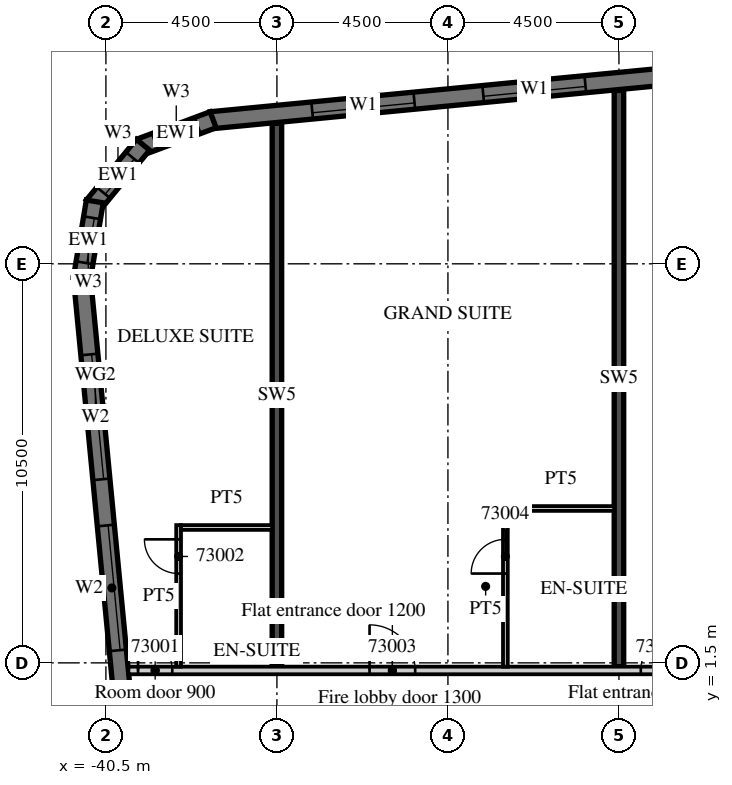
"""IFC4 building model, lengths in metres.
Left out: names, types, materials, properties, quantities, classifications, styles, units other than length and angle.
Written with IfcOpenShell. Run it as: python <this file> out.ifc"""

import sys

from ifc_helpers import new_model, si_unit, direction, frame, frame_2d, origin, place, context, subcontext, project, spatial, polyline, rectangle, outline, extrude, element, fill, save


model = new_model("IFC4")
c1 = context("Model", 3, precision=1e-05, world=origin(), true_north=direction((0.0, 1.0)))
c2 = subcontext(c1, "Body", "Model", "MODEL_VIEW")
j1 = project(units=[si_unit("LENGTHUNIT", "METRE"), si_unit("PLANEANGLEUNIT", "RADIAN")], contexts=[c1])
p1 = place(None, origin())
s1 = spatial("IfcSite", under=j1, at=p1, CompositionType="ELEMENT")
p2 = place(p1, origin())
s2 = spatial("IfcBuilding", under=s1, at=p2, CompositionType="ELEMENT")
p3 = place(p2, frame((0.0, 0.0, 291.6)))
s3 = spatial("IfcBuildingStorey", under=s2, at=p3, CompositionType="ELEMENT", Elevation=291.6)
p4 = place(p3, frame((-36.0, 1.4, 0.0), z_axis=(0.0, 0.0, 1.0), x_axis=(0.0, 1.0, 0.0)))
e1 = element("IfcWall", 1, at=p4, inside=s3, PredefinedType="SHEAR", context=c2, shape_type="SweptSolid", body=[
    extrude(rectangle(XDim=14.296, YDim=0.25, at=frame_2d((7.148, 0.0))), origin(), (0.0, 0.0, 1.0), 3.3),
])
p5 = place(p3, frame((-27.0, 1.4, 0.0), z_axis=(0.0, 0.0, 1.0), x_axis=(0.0, 1.0, 0.0)))
e2 = element("IfcWall", 2, at=p5, inside=s3, PredefinedType="SHEAR", context=c2, shape_type="SweptSolid", body=[
    extrude(rectangle(XDim=15.163, YDim=0.25, at=frame_2d((7.582, 0.0))), origin(), (0.0, 0.0, 1.0), 3.3),
])
p6 = place(p3, frame((-41.132, 11.658, 0.0), z_axis=(0.0, 0.0, 1.0), x_axis=(0.095847749461, -0.995396006082, 0.0)))
e3 = element("IfcWall", 3, at=p6, inside=s3, PredefinedType="SOLIDWALL", context=c2, shape_type="SweptSolid", body=[
    extrude(rectangle(XDim=32.0, YDim=0.45, at=frame_2d((16.0, 0.0))), origin(), (0.0, 0.0, 1.0), 3.02),
])
p7 = place(p6, frame((2.053, 0.0, 0.45)))
e4 = element("IfcOpeningElement", 4, at=p7, cuts=e3, PredefinedType="OPENING", context=c2, shape_type="SweptSolid", body=[
    extrude(rectangle(XDim=3.3, YDim=2.25, at=frame_2d((1.65, 1.125))), frame((0.0, 0.235, 0.0), z_axis=(0.0, -1.0, 0.0), x_axis=(1.0, 0.0, 0.0)), (0.0, 0.0, 1.0), 0.47),
])
p8 = place(p6, frame((6.574, 0.0, 0.45)))
e5 = element("IfcOpeningElement", 5, at=p8, cuts=e3, PredefinedType="OPENING", context=c2, shape_type="SweptSolid", body=[
    extrude(rectangle(XDim=3.3, YDim=2.25, at=frame_2d((1.65, 1.125))), frame((0.0, 0.235, 0.0), z_axis=(0.0, -1.0, 0.0), x_axis=(1.0, 0.0, 0.0)), (0.0, 0.0, 1.0), 0.47),
])
p9 = place(p3, frame((13.521, 20.713, 0.0), z_axis=(0.0, 0.0, 1.0), x_axis=(-0.995396277313, -0.095844932638, 0.0)))
e6 = element("IfcWall", 6, at=p9, inside=s3, PredefinedType="SOLIDWALL", context=c2, shape_type="SweptSolid", body=[
    extrude(rectangle(XDim=51.495, YDim=0.45, at=frame_2d((25.748, 0.0))), origin(), (0.0, 0.0, 1.0), 3.02),
])
p10 = place(p9, frame((0.91, 0.0, 0.45)))
e7 = element("IfcOpeningElement", 7, at=p10, cuts=e6, PredefinedType="OPENING", context=c2, shape_type="SweptSolid", body=[
    extrude(rectangle(XDim=2.7, YDim=2.25, at=frame_2d((1.35, 1.125))), frame((0.0, 0.235, 0.0), z_axis=(0.0, -1.0, 0.0), x_axis=(1.0, 0.0, 0.0)), (0.0, 0.0, 1.0), 0.47),
])
p11 = place(p9, frame((5.431, 0.0, 0.45)))
e8 = element("IfcOpeningElement", 8, at=p11, cuts=e6, PredefinedType="OPENING", context=c2, shape_type="SweptSolid", body=[
    extrude(rectangle(XDim=2.7, YDim=2.25, at=frame_2d((1.35, 1.125))), frame((0.0, 0.235, 0.0), z_axis=(0.0, -1.0, 0.0), x_axis=(1.0, 0.0, 0.0)), (0.0, 0.0, 1.0), 0.47),
])
p12 = place(p9, frame((9.952, 0.0, 0.45)))
e9 = element("IfcOpeningElement", 9, at=p12, cuts=e6, PredefinedType="OPENING", context=c2, shape_type="SweptSolid", body=[
    extrude(rectangle(XDim=2.7, YDim=2.25, at=frame_2d((1.35, 1.125))), frame((0.0, 0.235, 0.0), z_axis=(0.0, -1.0, 0.0), x_axis=(1.0, 0.0, 0.0)), (0.0, 0.0, 1.0), 0.47),
])
p13 = place(p9, frame((14.473, 0.0, 0.45)))
e10 = element("IfcOpeningElement", 10, at=p13, cuts=e6, PredefinedType="OPENING", context=c2, shape_type="SweptSolid", body=[
    extrude(rectangle(XDim=2.7, YDim=2.25, at=frame_2d((1.35, 1.125))), frame((0.0, 0.235, 0.0), z_axis=(0.0, -1.0, 0.0), x_axis=(1.0, 0.0, 0.0)), (0.0, 0.0, 1.0), 0.47),
])
p14 = place(p9, frame((18.994, 0.0, 0.45)))
e11 = element("IfcOpeningElement", 11, at=p14, cuts=e6, PredefinedType="OPENING", context=c2, shape_type="SweptSolid", body=[
    extrude(rectangle(XDim=2.7, YDim=2.25, at=frame_2d((1.35, 1.125))), frame((0.0, 0.235, 0.0), z_axis=(0.0, -1.0, 0.0), x_axis=(1.0, 0.0, 0.0)), (0.0, 0.0, 1.0), 0.47),
])
p15 = place(p9, frame((23.514, 0.0, 0.45)))
e12 = element("IfcOpeningElement", 12, at=p15, cuts=e6, PredefinedType="OPENING", context=c2, shape_type="SweptSolid", body=[
    extrude(rectangle(XDim=2.7, YDim=2.25, at=frame_2d((1.35, 1.125))), frame((0.0, 0.235, 0.0), z_axis=(0.0, -1.0, 0.0), x_axis=(1.0, 0.0, 0.0)), (0.0, 0.0, 1.0), 0.47),
])
p16 = place(p9, frame((28.035, 0.0, 0.45)))
e13 = element("IfcOpeningElement", 13, at=p16, cuts=e6, PredefinedType="OPENING", context=c2, shape_type="SweptSolid", body=[
    extrude(rectangle(XDim=2.7, YDim=2.25, at=frame_2d((1.35, 1.125))), frame((0.0, 0.235, 0.0), z_axis=(0.0, -1.0, 0.0), x_axis=(1.0, 0.0, 0.0)), (0.0, 0.0, 1.0), 0.47),
])
p17 = place(p9, frame((32.556, 0.0, 0.45)))
e14 = element("IfcOpeningElement", 14, at=p17, cuts=e6, PredefinedType="OPENING", context=c2, shape_type="SweptSolid", body=[
    extrude(rectangle(XDim=2.7, YDim=2.25, at=frame_2d((1.35, 1.125))), frame((0.0, 0.235, 0.0), z_axis=(0.0, -1.0, 0.0), x_axis=(1.0, 0.0, 0.0)), (0.0, 0.0, 1.0), 0.47),
])
p18 = place(p9, frame((37.077, 0.0, 0.45)))
e15 = element("IfcOpeningElement", 15, at=p18, cuts=e6, PredefinedType="OPENING", context=c2, shape_type="SweptSolid", body=[
    extrude(rectangle(XDim=2.7, YDim=2.25, at=frame_2d((1.35, 1.125))), frame((0.0, 0.235, 0.0), z_axis=(0.0, -1.0, 0.0), x_axis=(1.0, 0.0, 0.0)), (0.0, 0.0, 1.0), 0.47),
])
p19 = place(p9, frame((41.598, 0.0, 0.45)))
e16 = element("IfcOpeningElement", 16, at=p19, cuts=e6, PredefinedType="OPENING", context=c2, shape_type="SweptSolid", body=[
    extrude(rectangle(XDim=2.7, YDim=2.25, at=frame_2d((1.35, 1.125))), frame((0.0, 0.235, 0.0), z_axis=(0.0, -1.0, 0.0), x_axis=(1.0, 0.0, 0.0)), (0.0, 0.0, 1.0), 0.47),
])
p20 = place(p9, frame((46.118, 0.0, 0.45)))
e17 = element("IfcOpeningElement", 17, at=p20, cuts=e6, PredefinedType="OPENING", context=c2, shape_type="SweptSolid", body=[
    extrude(rectangle(XDim=2.7, YDim=2.25, at=frame_2d((1.35, 1.125))), frame((0.0, 0.235, 0.0), z_axis=(0.0, -1.0, 0.0), x_axis=(1.0, 0.0, 0.0)), (0.0, 0.0, 1.0), 0.47),
])
p21 = place(p3, frame((-37.679, 15.791, 0.0), z_axis=(0.0, 0.0, 1.0), x_axis=(-0.936677599948, -0.350192909346, 0.0)))
e18 = element("IfcWall", 18, at=p21, inside=s3, PredefinedType="SOLIDWALL", context=c2, shape_type="SweptSolid", body=[
    extrude(outline(polyline([(0.0, -0.225), (2.071, -0.225), (1.95, 0.225), (0.121, 0.225), (0.0, -0.225)])), origin(), (0.0, 0.0, 1.0), 3.02),
])
p22 = place(p21, frame((0.435, 0.0, 0.45)))
e19 = element("IfcOpeningElement", 19, at=p22, cuts=e18, PredefinedType="OPENING", context=c2, shape_type="SweptSolid", body=[
    extrude(rectangle(XDim=1.2, YDim=2.25, at=frame_2d((0.6, 1.125))), frame((0.0, 0.235, 0.0), z_axis=(0.0, -1.0, 0.0), x_axis=(1.0, 0.0, 0.0)), (0.0, 0.0, 1.0), 0.47),
])
p23 = place(p3, frame((-39.524, 15.133, 0.0), z_axis=(0.0, 0.0, 1.0), x_axis=(-0.636046112757, -0.771651049663, 0.0)))
e20 = element("IfcWall", 20, at=p23, inside=s3, PredefinedType="SOLIDWALL", context=c2, shape_type="SweptSolid", body=[
    extrude(outline(polyline([(0.0, -0.225), (2.071, -0.225), (1.95, 0.225), (0.121, 0.225), (0.0, -0.225)])), origin(), (0.0, 0.0, 1.0), 3.02),
])
p24 = place(p23, frame((0.435, 0.0, 0.45)))
e21 = element("IfcOpeningElement", 21, at=p24, cuts=e20, PredefinedType="OPENING", context=c2, shape_type="SweptSolid", body=[
    extrude(rectangle(XDim=1.2, YDim=2.25, at=frame_2d((0.6, 1.125))), frame((0.0, 0.235, 0.0), z_axis=(0.0, -1.0, 0.0), x_axis=(1.0, 0.0, 0.0)), (0.0, 0.0, 1.0), 0.47),
])
p25 = place(p3, frame((-40.792, 13.641, 0.0), z_axis=(0.0, 0.0, 1.0), x_axis=(-0.165068144653, -0.986282164302, 0.0)))
e22 = element("IfcWall", 22, at=p25, inside=s3, PredefinedType="SOLIDWALL", context=c2, shape_type="SweptSolid", body=[
    extrude(outline(polyline([(0.0, -0.225), (2.071, -0.225), (1.95, 0.225), (0.121, 0.225), (0.0, -0.225)])), origin(), (0.0, 0.0, 1.0), 3.02),
])
p26 = place(p25, frame((0.435, 0.0, 0.45)))
e23 = element("IfcOpeningElement", 23, at=p26, cuts=e22, PredefinedType="OPENING", context=c2, shape_type="SweptSolid", body=[
    extrude(rectangle(XDim=1.2, YDim=2.25, at=frame_2d((0.6, 1.125))), frame((0.0, 0.235, 0.0), z_axis=(0.0, -1.0, 0.0), x_axis=(1.0, 0.0, 0.0)), (0.0, 0.0, 1.0), 0.47),
])
p27 = place(p3, frame((-39.909, 1.3, 0.0), z_axis=(0.0, 0.0, 1.0), x_axis=(1.0, 0.0, 0.0)))
e24 = element("IfcWall", 24, at=p27, inside=s3, PredefinedType="PARTITIONING", context=c2, shape_type="SweptSolid", body=[
    extrude(rectangle(XDim=53.409, YDim=0.2, at=frame_2d((26.705, 0.0))), origin(), (0.0, 0.0, 1.0), 3.02),
])
p28 = place(p27, frame((0.255, 0.0, 0.0)))
e25 = element("IfcOpeningElement", 25, at=p28, cuts=e24, PredefinedType="OPENING", context=c2, shape_type="SweptSolid", body=[
    extrude(rectangle(XDim=0.9, YDim=2.1, at=frame_2d((0.45, 1.05))), frame((0.0, 0.11, 0.0), z_axis=(0.0, -1.0, 0.0), x_axis=(1.0, 0.0, 0.0)), (0.0, 0.0, 1.0), 0.22),
])
p29 = place(p27, frame((6.347, 0.0, 0.0)))
e26 = element("IfcOpeningElement", 26, at=p29, cuts=e24, PredefinedType="OPENING", context=c2, shape_type="SweptSolid", body=[
    extrude(rectangle(XDim=1.2, YDim=2.1, at=frame_2d((0.6, 1.05))), frame((0.0, 0.11, 0.0), z_axis=(0.0, -1.0, 0.0), x_axis=(1.0, 0.0, 0.0)), (0.0, 0.0, 1.0), 0.22),
])
p30 = place(p27, frame((13.484, 0.0, 0.0)))
e27 = element("IfcOpeningElement", 27, at=p30, cuts=e24, PredefinedType="OPENING", context=c2, shape_type="SweptSolid", body=[
    extrude(rectangle(XDim=1.0, YDim=2.1, at=frame_2d((0.5, 1.05))), frame((0.0, 0.11, 0.0), z_axis=(0.0, -1.0, 0.0), x_axis=(1.0, 0.0, 0.0)), (0.0, 0.0, 1.0), 0.22),
])
p31 = place(p27, frame((20.334, 0.0, 0.0)))
e28 = element("IfcOpeningElement", 28, at=p31, cuts=e24, PredefinedType="OPENING", context=c2, shape_type="SweptSolid", body=[
    extrude(rectangle(XDim=1.0, YDim=2.1, at=frame_2d((0.5, 1.05))), frame((0.0, 0.11, 0.0), z_axis=(0.0, -1.0, 0.0), x_axis=(1.0, 0.0, 0.0)), (0.0, 0.0, 1.0), 0.22),
])
p32 = place(p27, frame((22.484, 0.0, 0.0)))
e29 = element("IfcOpeningElement", 29, at=p32, cuts=e24, PredefinedType="OPENING", context=c2, shape_type="SweptSolid", body=[
    extrude(rectangle(XDim=1.0, YDim=2.1, at=frame_2d((0.5, 1.05))), frame((0.0, 0.11, 0.0), z_axis=(0.0, -1.0, 0.0), x_axis=(1.0, 0.0, 0.0)), (0.0, 0.0, 1.0), 0.22),
])
p33 = place(p27, frame((26.959, 0.0, 0.0)))
e30 = element("IfcOpeningElement", 30, at=p33, cuts=e24, PredefinedType="OPENING", context=c2, shape_type="SweptSolid", body=[
    extrude(rectangle(XDim=1.0, YDim=2.1, at=frame_2d((0.5, 1.05))), frame((0.0, 0.11, 0.0), z_axis=(0.0, -1.0, 0.0), x_axis=(1.0, 0.0, 0.0)), (0.0, 0.0, 1.0), 0.22),
])
p34 = place(p27, frame((36.271, 0.0, 0.0)))
e31 = element("IfcOpeningElement", 31, at=p34, cuts=e24, PredefinedType="OPENING", context=c2, shape_type="SweptSolid", body=[
    extrude(rectangle(XDim=1.2, YDim=2.1, at=frame_2d((0.6, 1.05))), frame((0.0, 0.11, 0.0), z_axis=(0.0, -1.0, 0.0), x_axis=(1.0, 0.0, 0.0)), (0.0, 0.0, 1.0), 0.22),
])
p35 = place(p27, frame((40.484, 0.0, 0.0)))
e32 = element("IfcOpeningElement", 32, at=p35, cuts=e24, PredefinedType="OPENING", context=c2, shape_type="SweptSolid", body=[
    extrude(rectangle(XDim=1.0, YDim=2.1, at=frame_2d((0.5, 1.05))), frame((0.0, 0.11, 0.0), z_axis=(0.0, -1.0, 0.0), x_axis=(1.0, 0.0, 0.0)), (0.0, 0.0, 1.0), 0.22),
])
p36 = place(p27, frame((44.959, 0.0, 0.0)))
e33 = element("IfcOpeningElement", 33, at=p36, cuts=e24, PredefinedType="OPENING", context=c2, shape_type="SweptSolid", body=[
    extrude(rectangle(XDim=1.0, YDim=2.1, at=frame_2d((0.5, 1.05))), frame((0.0, 0.11, 0.0), z_axis=(0.0, -1.0, 0.0), x_axis=(1.0, 0.0, 0.0)), (0.0, 0.0, 1.0), 0.22),
])
p37 = place(p27, frame((51.834, 0.0, 0.0)))
e34 = element("IfcOpeningElement", 34, at=p37, cuts=e24, PredefinedType="OPENING", context=c2, shape_type="SweptSolid", body=[
    extrude(rectangle(XDim=1.0, YDim=2.1, at=frame_2d((0.5, 1.05))), frame((0.0, 0.11, 0.0), z_axis=(0.0, -1.0, 0.0), x_axis=(1.0, 0.0, 0.0)), (0.0, 0.0, 1.0), 0.22),
])
p38 = place(p3, frame((-38.587, 1.4, 0.0), z_axis=(0.0, 0.0, 1.0), x_axis=(0.0, 1.0, 0.0)))
e35 = element("IfcWall", 35, at=p38, inside=s3, PredefinedType="PARTITIONING", context=c2, shape_type="SweptSolid", body=[
    extrude(rectangle(XDim=3.725, YDim=0.125, at=frame_2d((1.863, 0.0))), origin(), (0.0, 0.0, 1.0), 3.02),
])
p39 = place(p38, frame((2.45, 0.0, 0.0)))
e36 = element("IfcOpeningElement", 36, at=p39, cuts=e35, PredefinedType="OPENING", context=c2, shape_type="SweptSolid", body=[
    extrude(rectangle(XDim=0.9, YDim=2.1, at=frame_2d((0.45, 1.05))), frame((0.0, 0.073, 0.0), z_axis=(0.0, -1.0, 0.0), x_axis=(1.0, 0.0, 0.0)), (0.0, 0.0, 1.0), 0.145),
])
p40 = place(p3, frame((-38.525, 5.062, 0.0), z_axis=(0.0, 0.0, 1.0), x_axis=(1.0, 0.0, 0.0)))
e37 = element("IfcWall", 37, at=p40, inside=s3, PredefinedType="PARTITIONING", context=c2, shape_type="SweptSolid", body=[
    extrude(rectangle(XDim=2.4, YDim=0.125, at=frame_2d((1.2, 0.0))), origin(), (0.0, 0.0, 1.0), 3.02),
])
p41 = place(p3, frame((-29.988, 1.4, 0.0), z_axis=(0.0, 0.0, 1.0), x_axis=(0.0, 1.0, 0.0)))
e38 = element("IfcWall", 38, at=p41, inside=s3, PredefinedType="PARTITIONING", context=c2, shape_type="SweptSolid", body=[
    extrude(rectangle(XDim=4.225, YDim=0.125, at=frame_2d((2.113, 0.0))), origin(), (0.0, 0.0, 1.0), 3.02),
])
p42 = place(p41, frame((2.45, 0.0, 0.0)))
e39 = element("IfcOpeningElement", 39, at=p42, cuts=e38, PredefinedType="OPENING", context=c2, shape_type="SweptSolid", body=[
    extrude(rectangle(XDim=0.9, YDim=2.1, at=frame_2d((0.45, 1.05))), frame((0.0, 0.073, 0.0), z_axis=(0.0, -1.0, 0.0), x_axis=(1.0, 0.0, 0.0)), (0.0, 0.0, 1.0), 0.145),
])
p43 = place(p3, frame((-29.925, 5.562, 0.0), z_axis=(0.0, 0.0, 1.0), x_axis=(1.0, 0.0, 0.0)))
e40 = element("IfcWall", 40, at=p43, inside=s3, PredefinedType="PARTITIONING", context=c2, shape_type="SweptSolid", body=[
    extrude(rectangle(XDim=2.8, YDim=0.125, at=frame_2d((1.4, 0.0))), origin(), (0.0, 0.0, 1.0), 3.02),
])
p44 = place(p7, origin())
e41 = element("IfcWindow", 41, at=p44, inside=s3, PartitioningType="SINGLE_PANEL", PredefinedType="WINDOW", context=c2, shape_type="SweptSolid", body=[
    extrude(rectangle(XDim=3.3, YDim=2.25, at=frame_2d((1.65, 1.125))), frame((0.0, 0.09, 0.0), z_axis=(0.0, -1.0, 0.0), x_axis=(1.0, 0.0, 0.0)), (0.0, 0.0, 1.0), 0.06),
])
fill(e4, e41)
p45 = place(p8, origin())
e42 = element("IfcWindow", 42, at=p45, inside=s3, PartitioningType="SINGLE_PANEL", PredefinedType="WINDOW", context=c2, shape_type="SweptSolid", body=[
    extrude(rectangle(XDim=3.3, YDim=2.25, at=frame_2d((1.65, 1.125))), frame((0.0, 0.09, 0.0), z_axis=(0.0, -1.0, 0.0), x_axis=(1.0, 0.0, 0.0)), (0.0, 0.0, 1.0), 0.06),
])
fill(e5, e42)
p46 = place(p19, origin())
e43 = element("IfcWindow", 43, at=p46, inside=s3, PartitioningType="SINGLE_PANEL", PredefinedType="WINDOW", context=c2, shape_type="SweptSolid", body=[
    extrude(rectangle(XDim=2.7, YDim=2.25, at=frame_2d((1.35, 1.125))), frame((0.0, 0.09, 0.0), z_axis=(0.0, -1.0, 0.0), x_axis=(1.0, 0.0, 0.0)), (0.0, 0.0, 1.0), 0.06),
])
fill(e16, e43)
p47 = place(p20, origin())
e44 = element("IfcWindow", 44, at=p47, inside=s3, PartitioningType="SINGLE_PANEL", PredefinedType="WINDOW", context=c2, shape_type="SweptSolid", body=[
    extrude(rectangle(XDim=2.7, YDim=2.25, at=frame_2d((1.35, 1.125))), frame((0.0, 0.09, 0.0), z_axis=(0.0, -1.0, 0.0), x_axis=(1.0, 0.0, 0.0)), (0.0, 0.0, 1.0), 0.06),
])
fill(e17, e44)
p48 = place(p22, origin())
e45 = element("IfcWindow", 45, at=p48, inside=s3, PartitioningType="SINGLE_PANEL", PredefinedType="WINDOW", context=c2, shape_type="SweptSolid", body=[
    extrude(rectangle(XDim=1.2, YDim=2.25, at=frame_2d((0.6, 1.125))), frame((0.0, 0.09, 0.0), z_axis=(0.0, -1.0, 0.0), x_axis=(1.0, 0.0, 0.0)), (0.0, 0.0, 1.0), 0.06),
])
fill(e19, e45)
p49 = place(p24, origin())
e46 = element("IfcWindow", 46, at=p49, inside=s3, PartitioningType="SINGLE_PANEL", PredefinedType="WINDOW", context=c2, shape_type="SweptSolid", body=[
    extrude(rectangle(XDim=1.2, YDim=2.25, at=frame_2d((0.6, 1.125))), frame((0.0, 0.09, 0.0), z_axis=(0.0, -1.0, 0.0), x_axis=(1.0, 0.0, 0.0)), (0.0, 0.0, 1.0), 0.06),
])
fill(e21, e46)
p50 = place(p26, origin())
e47 = element("IfcWindow", 47, at=p50, inside=s3, PartitioningType="SINGLE_PANEL", PredefinedType="WINDOW", context=c2, shape_type="SweptSolid", body=[
    extrude(rectangle(XDim=1.2, YDim=2.25, at=frame_2d((0.6, 1.125))), frame((0.0, 0.09, 0.0), z_axis=(0.0, -1.0, 0.0), x_axis=(1.0, 0.0, 0.0)), (0.0, 0.0, 1.0), 0.06),
])
fill(e23, e47)
p51 = place(p28, origin())
e48 = element("IfcDoor", 48, at=p51, inside=s3, OperationType="SINGLE_SWING_LEFT", PredefinedType="DOOR", context=c2, shape_type="SweptSolid", body=[
    extrude(rectangle(XDim=0.9, YDim=2.1, at=frame_2d((0.45, 1.05))), frame((0.0, 0.025, 0.0), z_axis=(0.0, -1.0, 0.0), x_axis=(1.0, 0.0, 0.0)), (0.0, 0.0, 1.0), 0.05),
])
fill(e25, e48)
p52 = place(p39, origin())
e49 = element("IfcDoor", 49, at=p52, inside=s3, OperationType="SINGLE_SWING_RIGHT", PredefinedType="DOOR", context=c2, shape_type="SweptSolid", body=[
    extrude(rectangle(XDim=0.9, YDim=2.1, at=frame_2d((0.45, 1.05))), frame((0.0, 0.025, 0.0), z_axis=(0.0, -1.0, 0.0), x_axis=(1.0, 0.0, 0.0)), (0.0, 0.0, 1.0), 0.05),
])
fill(e36, e49)
p53 = place(p29, origin())
e50 = element("IfcDoor", 50, at=p53, inside=s3, OperationType="SINGLE_SWING_LEFT", PredefinedType="DOOR", context=c2, shape_type="SweptSolid", body=[
    extrude(rectangle(XDim=1.2, YDim=2.1, at=frame_2d((0.6, 1.05))), frame((0.0, 0.025, 0.0), z_axis=(0.0, -1.0, 0.0), x_axis=(1.0, 0.0, 0.0)), (0.0, 0.0, 1.0), 0.05),
])
fill(e26, e50)
p54 = place(p42, origin())
e51 = element("IfcDoor", 51, at=p54, inside=s3, OperationType="SINGLE_SWING_LEFT", PredefinedType="DOOR", context=c2, shape_type="SweptSolid", body=[
    extrude(rectangle(XDim=0.9, YDim=2.1, at=frame_2d((0.45, 1.05))), frame((0.0, 0.025, 0.0), z_axis=(0.0, -1.0, 0.0), x_axis=(1.0, 0.0, 0.0)), (0.0, 0.0, 1.0), 0.05),
])
fill(e39, e51)
p55 = place(p30, origin())
e52 = element("IfcDoor", 52, at=p55, inside=s3, OperationType="SINGLE_SWING_RIGHT", PredefinedType="DOOR", context=c2, shape_type="SweptSolid", body=[
    extrude(rectangle(XDim=1.0, YDim=2.1, at=frame_2d((0.5, 1.05))), frame((0.0, 0.025, 0.0), z_axis=(0.0, -1.0, 0.0), x_axis=(1.0, 0.0, 0.0)), (0.0, 0.0, 1.0), 0.05),
])
fill(e27, e52)
save(model, sys.argv[1])
